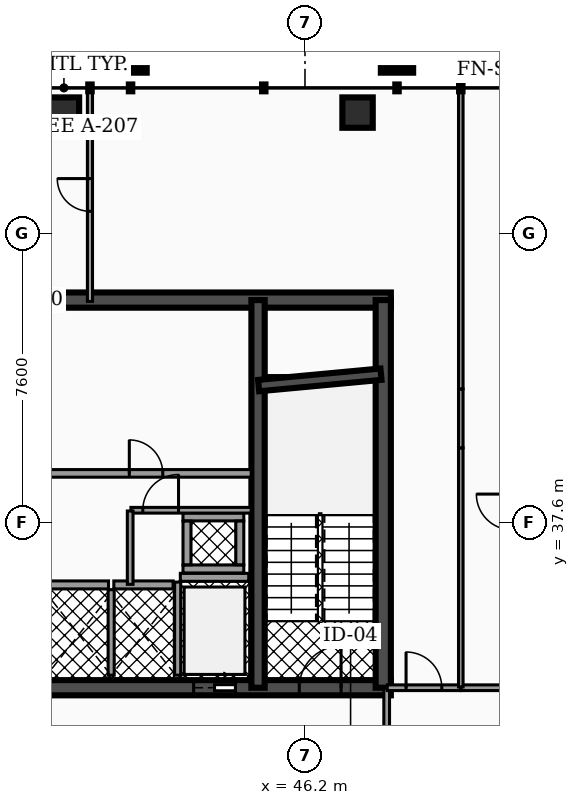
"""IFC4 building model, lengths in metres.
Left out: names, types, materials, properties, quantities, classifications, styles, units other than length and angle.
Written with IfcOpenShell. Run it as: python <this file> out.ifc"""

import sys

from ifc_helpers import new_model, si_unit, direction, frame, frame_2d, origin, origin_2d, place, context, subcontext, project, spatial, rectangle, hollow_rectangle, extrude, element, fill, save


model = new_model("IFC4")
c1 = context("Model", 3, precision=1e-05, world=origin(), true_north=direction((0.0, 1.0)))
c2 = subcontext(c1, "Body", "Model", "MODEL_VIEW")
j1 = project(units=[si_unit("LENGTHUNIT", "METRE"), si_unit("PLANEANGLEUNIT", "RADIAN")], contexts=[c1])
p1 = place(None, origin())
s1 = spatial("IfcSite", under=j1, at=p1, CompositionType="ELEMENT")
p2 = place(p1, origin())
s2 = spatial("IfcBuilding", under=s1, at=p2, CompositionType="ELEMENT")
p3 = place(p2, frame((0.0, 0.0, 145.86)))
s3 = spatial("IfcBuildingStorey", under=s2, at=p3, CompositionType="ELEMENT", Elevation=145.86)
p4 = place(p3, frame((28.4, 43.45, 0.0), z_axis=(0.0, 0.0, 1.0), x_axis=(1.0, 0.0, 0.0)))
e1 = element("IfcWall", 1, at=p4, inside=s3, PredefinedType="SHEAR", context=c2, shape_type="SweptSolid", body=[
    extrude(rectangle(XDim=20.06, YDim=0.4, at=frame_2d((10.03, 0.0))), origin(), (0.0, 0.0, 1.0), 3.5),
])
p5 = place(p3, frame((28.4, 33.25, 0.0), z_axis=(0.0, 0.0, 1.0), x_axis=(1.0, 0.0, 0.0)))
e2 = element("IfcWall", 2, at=p5, inside=s3, PredefinedType="SHEAR", context=c2, shape_type="SweptSolid", body=[
    extrude(rectangle(XDim=20.06, YDim=0.4, at=frame_2d((10.03, 0.0))), origin(), (0.0, 0.0, 1.0), 3.5),
])
p6 = place(p5, frame((4.03, 0.0, 0.0)))
e3 = element("IfcOpeningElement", 3, at=p6, cuts=e2, PredefinedType="OPENING", context=c2, shape_type="SweptSolid", body=[
    extrude(rectangle(XDim=1.1, YDim=2.15, at=frame_2d((0.55, 1.075))), frame((0.0, 0.21, 0.0), z_axis=(0.0, -1.0, 0.0), x_axis=(1.0, 0.0, 0.0)), (0.0, 0.0, 1.0), 0.42),
])
p7 = place(p5, frame((14.87, 0.0, 0.0)))
e4 = element("IfcOpeningElement", 4, at=p7, cuts=e2, PredefinedType="OPENING", context=c2, shape_type="SweptSolid", body=[
    extrude(rectangle(XDim=1.1, YDim=2.15, at=frame_2d((0.55, 1.075))), frame((0.0, 0.21, 0.0), z_axis=(0.0, -1.0, 0.0), x_axis=(1.0, 0.0, 0.0)), (0.0, 0.0, 1.0), 0.42),
])
p8 = place(p5, frame((5.95, 0.0, 0.0)))
e5 = element("IfcOpeningElement", 5, at=p8, cuts=e2, PredefinedType="OPENING", context=c2, shape_type="SweptSolid", body=[
    extrude(rectangle(XDim=1.0, YDim=2.1, at=frame_2d((0.5, 1.05))), frame((0.0, 0.21, 0.0), z_axis=(0.0, -1.0, 0.0), x_axis=(1.0, 0.0, 0.0)), (0.0, 0.0, 1.0), 0.42),
])
p9 = place(p5, frame((7.65, 0.0, 0.0)))
e6 = element("IfcOpeningElement", 6, at=p9, cuts=e2, PredefinedType="OPENING", context=c2, shape_type="SweptSolid", body=[
    extrude(rectangle(XDim=1.0, YDim=2.1, at=frame_2d((0.5, 1.05))), frame((0.0, 0.21, 0.0), z_axis=(0.0, -1.0, 0.0), x_axis=(1.0, 0.0, 0.0)), (0.0, 0.0, 1.0), 0.42),
])
p10 = place(p5, frame((1.31, 0.0, 0.0)))
e7 = element("IfcOpeningElement", 7, at=p10, cuts=e2, PredefinedType="OPENING", context=c2, shape_type="SweptSolid", body=[
    extrude(rectangle(XDim=1.1, YDim=2.2, at=frame_2d((0.55, 1.1))), frame((0.0, 0.21, 0.0), z_axis=(0.0, -1.0, 0.0), x_axis=(1.0, 0.0, 0.0)), (0.0, 0.0, 1.0), 0.42),
])
p11 = place(p5, frame((9.44, 0.0, 0.0)))
e8 = element("IfcOpeningElement", 8, at=p11, cuts=e2, PredefinedType="OPENING", context=c2, shape_type="SweptSolid", body=[
    extrude(rectangle(XDim=1.12, YDim=2.05, at=frame_2d((0.56, 1.025))), frame((0.0, 0.21, 0.0), z_axis=(0.0, -1.0, 0.0), x_axis=(1.0, 0.0, 0.0)), (0.0, 0.0, 1.0), 0.42),
])
p12 = place(p5, frame((17.65, 0.0, 0.0)))
e9 = element("IfcOpeningElement", 9, at=p12, cuts=e2, PredefinedType="OPENING", context=c2, shape_type="SweptSolid", body=[
    extrude(rectangle(XDim=1.1, YDim=2.2, at=frame_2d((0.55, 1.1))), frame((0.0, 0.21, 0.0), z_axis=(0.0, -1.0, 0.0), x_axis=(1.0, 0.0, 0.0)), (0.0, 0.0, 1.0), 0.42),
])
p13 = place(p3, frame((44.965, 33.25, 0.0), z_axis=(0.0, 0.0, 1.0), x_axis=(0.0, 1.0, 0.0)))
e10 = element("IfcWall", 10, at=p13, inside=s3, PredefinedType="SHEAR", context=c2, shape_type="SweptSolid", body=[
    extrude(rectangle(XDim=10.2, YDim=0.35, at=frame_2d((5.1, 0.0))), origin(), (0.0, 0.0, 1.0), 3.5),
])
p14 = place(p3, frame((48.26, 33.25, 0.0), z_axis=(0.0, 0.0, 1.0), x_axis=(0.0, 1.0, 0.0)))
e11 = element("IfcWall", 11, at=p14, inside=s3, PredefinedType="SHEAR", context=c2, shape_type="SweptSolid", body=[
    extrude(rectangle(XDim=10.2, YDim=0.4, at=frame_2d((5.1, 0.0))), origin(), (0.0, 0.0, 1.0), 3.5),
])
p15 = place(p3, frame((44.98, 41.2, 0.0), z_axis=(0.0, 0.0, 1.0), x_axis=(0.995686468965, 0.09278176286, 0.0)))
e12 = element("IfcWall", 12, at=p15, inside=s3, PredefinedType="SHEAR", context=c2, shape_type="SweptSolid", body=[
    extrude(rectangle(XDim=3.234, YDim=0.3, at=frame_2d((1.617, 0.0))), origin(), (0.0, 0.0, 1.0), 3.5),
])
for number, where, z_axis, x_axis in (
    (13, (47.583, 48.383, 0.0), (0.0, 0.0, 1.0), (1.0, 0.0, 0.0)),
    (14, (39.857, 48.383, 0.0), (0.0, 0.0, 1.0), (1.0, 0.0, 0.0)),
):
    element("IfcColumn", number, at=place(p3, frame(where, z_axis=z_axis, x_axis=x_axis)), inside=s3, PredefinedType="COLUMN", context=c2, shape_type="SweptSolid", body=[
        extrude(hollow_rectangle(XDim=0.8, YDim=0.8, WallThickness=0.04, at=origin_2d()), origin(), (0.0, 0.0, 1.0), 3.5),
    ])
p16 = place(p3, frame((42.92, 36.155, 0.0), z_axis=(0.0, 0.0, 1.0), x_axis=(1.0, 0.0, 0.0)))
e15 = element("IfcWall", 15, at=p16, inside=s3, PredefinedType="SOLIDWALL", context=c2, shape_type="SweptSolid", body=[
    extrude(rectangle(XDim=1.8, YDim=0.21, at=frame_2d((0.9, 0.0))), origin(), (0.0, 0.0, 1.0), 2.472),
])
p17 = place(p3, frame((42.85, 33.58, 0.0), z_axis=(0.0, 0.0, 1.0), x_axis=(0.0, 1.0, 0.0)))
e16 = element("IfcWall", 16, at=p17, inside=s3, PredefinedType="SOLIDWALL", context=c2, shape_type="SweptSolid", body=[
    extrude(rectangle(XDim=2.45, YDim=0.16, at=frame_2d((1.225, 0.0))), origin(), (0.0, 0.0, 1.0), 2.472),
])
p18 = place(p3, frame((39.47, 35.955, 0.0), z_axis=(0.0, 0.0, 1.0), x_axis=(1.0, 0.0, 0.0)))
e17 = element("IfcWall", 17, at=p18, inside=s3, PredefinedType="SOLIDWALL", context=c2, shape_type="SweptSolid", body=[
    extrude(rectangle(XDim=1.56, YDim=0.21, at=frame_2d((0.78, 0.0))), origin(), (0.0, 0.0, 1.0), 2.472),
])
p19 = place(p3, frame((41.1, 33.58, 0.0), z_axis=(0.0, 0.0, 1.0), x_axis=(0.0, 1.0, 0.0)))
e18 = element("IfcWall", 18, at=p19, inside=s3, PredefinedType="SOLIDWALL", context=c2, shape_type="SweptSolid", body=[
    extrude(rectangle(XDim=2.25, YDim=0.16, at=frame_2d((1.125, 0.0))), origin(), (0.0, 0.0, 1.0), 2.472),
])
p20 = place(p3, frame((41.17, 35.955, 0.0), z_axis=(0.0, 0.0, 1.0), x_axis=(1.0, 0.0, 0.0)))
e19 = element("IfcWall", 19, at=p20, inside=s3, PredefinedType="SOLIDWALL", context=c2, shape_type="SweptSolid", body=[
    extrude(rectangle(XDim=1.56, YDim=0.21, at=frame_2d((0.78, 0.0))), origin(), (0.0, 0.0, 1.0), 2.472),
])
for number, where, z_axis, x_axis in (
    (20, (42.99, 36.375, 0.0), (0.0, 0.0, 1.0), (1.0, 0.0, 0.0)),
    (21, (42.99, 37.745, 0.0), (0.0, 0.0, 1.0), (1.0, 0.0, 0.0)),
):
    element("IfcWall", number, at=place(p3, frame(where, z_axis=z_axis, x_axis=x_axis)), inside=s3, PredefinedType="SOLIDWALL", context=c2, shape_type="SweptSolid", body=[
        extrude(rectangle(XDim=1.6, YDim=0.21, at=frame_2d((0.8, 0.0))), origin(), (0.0, 0.0, 1.0), 3.5),
    ])
for number, where, z_axis, x_axis in (
    (22, (43.095, 36.485, 0.0), (0.0, 0.0, 1.0), (0.0, 1.0, 0.0)),
    (23, (44.485, 36.485, 0.0), (0.0, 0.0, 1.0), (0.0, 1.0, 0.0)),
):
    element("IfcWall", number, at=place(p3, frame(where, z_axis=z_axis, x_axis=x_axis)), inside=s3, PredefinedType="SOLIDWALL", context=c2, shape_type="SweptSolid", body=[
        extrude(rectangle(XDim=1.15, YDim=0.21, at=frame_2d((0.575, 0.0))), origin(), (0.0, 0.0, 1.0), 3.5),
    ])
p21 = place(p3, frame((39.25, 38.89, 0.0), z_axis=(0.0, 0.0, 1.0), x_axis=(1.0, 0.0, 0.0)))
e24 = element("IfcWall", 24, at=p21, inside=s3, PredefinedType="PARTITIONING", context=c2, shape_type="SweptSolid", body=[
    extrude(rectangle(XDim=5.535, YDim=0.2, at=frame_2d((2.768, 0.0))), origin(), (0.0, 0.0, 1.0), 2.457),
])
p22 = place(p21, frame((2.327, 0.0, 0.0)))
e25 = element("IfcOpeningElement", 25, at=p22, cuts=e24, PredefinedType="OPENING", context=c2, shape_type="SweptSolid", body=[
    extrude(rectangle(XDim=0.88, YDim=2.05, at=frame_2d((0.44, 1.025))), frame((0.0, 0.11, 0.0), z_axis=(0.0, -1.0, 0.0), x_axis=(1.0, 0.0, 0.0)), (0.0, 0.0, 1.0), 0.22),
])
p23 = place(p3, frame((41.62, 37.92, 0.0), z_axis=(0.0, 0.0, 1.0), x_axis=(1.0, 0.0, 0.0)))
e26 = element("IfcWall", 26, at=p23, inside=s3, PredefinedType="PARTITIONING", context=c2, shape_type="SweptSolid", body=[
    extrude(rectangle(XDim=3.165, YDim=0.15, at=frame_2d((1.583, 0.0))), origin(), (0.0, 0.0, 1.0), 2.457),
])
p24 = place(p23, frame((0.312, 0.0, 0.0)))
e27 = element("IfcOpeningElement", 27, at=p24, cuts=e26, PredefinedType="OPENING", context=c2, shape_type="SweptSolid", body=[
    extrude(rectangle(XDim=0.94, YDim=2.05, at=frame_2d((0.47, 1.025))), frame((0.0, 0.085, 0.0), z_axis=(0.0, -1.0, 0.0), x_axis=(1.0, 0.0, 0.0)), (0.0, 0.0, 1.0), 0.17),
])
p25 = place(p3, frame((41.6, 35.97, 0.0), z_axis=(0.0, 0.0, 1.0), x_axis=(0.0, 1.0, 0.0)))
e28 = element("IfcWall", 28, at=p25, inside=s3, PredefinedType="PARTITIONING", context=c2, shape_type="SweptSolid", body=[
    extrude(rectangle(XDim=1.93, YDim=0.15, at=frame_2d((0.965, 0.0))), origin(), (0.0, 0.0, 1.0), 2.457),
])
p26 = place(p3, frame((48.35, 30.17, 0.0), z_axis=(0.0, 0.0, 1.0), x_axis=(0.0, 1.0, 0.0)))
e29 = element("IfcWall", 29, at=p26, inside=s3, PredefinedType="PARTITIONING", context=c2, shape_type="SweptSolid", body=[
    extrude(rectangle(XDim=3.06, YDim=0.15, at=frame_2d((1.53, 0.0))), origin(), (0.0, 0.0, 1.0), 2.457),
])
p27 = place(p26, frame((1.06, 0.0, 0.0)))
e30 = element("IfcOpeningElement", 30, at=p27, cuts=e29, PredefinedType="OPENING", context=c2, shape_type="SweptSolid", body=[
    extrude(rectangle(XDim=0.94, YDim=2.05, at=frame_2d((0.47, 1.025))), frame((0.0, 0.085, 0.0), z_axis=(0.0, -1.0, 0.0), x_axis=(1.0, 0.0, 0.0)), (0.0, 0.0, 1.0), 0.17),
])
p28 = place(p3, frame((50.305, 33.25, 0.0), z_axis=(0.0, 0.0, 1.0), x_axis=(1.0, 0.0, 0.0)))
e31 = element("IfcWall", 31, at=p28, inside=s3, PredefinedType="PARTITIONING", context=c2, shape_type="SweptSolid", body=[
    extrude(rectangle(XDim=1.325, YDim=0.15, at=frame_2d((0.663, 0.0))), origin(), (0.0, 0.0, 1.0), 2.457),
])
p29 = place(p3, frame((48.365, 33.25, 0.0), z_axis=(0.0, 0.0, 1.0), x_axis=(1.0, 0.0, 0.0)))
e32 = element("IfcWall", 32, at=p29, inside=s3, PredefinedType="PARTITIONING", context=c2, shape_type="SweptSolid", body=[
    extrude(rectangle(XDim=1.93, YDim=0.15, at=frame_2d((0.965, 0.0))), origin(), (0.0, 0.0, 1.0), 2.457),
])
p30 = place(p29, frame((0.495, 0.0, 0.0)))
e33 = element("IfcOpeningElement", 33, at=p30, cuts=e32, PredefinedType="OPENING", context=c2, shape_type="SweptSolid", body=[
    extrude(rectangle(XDim=0.94, YDim=2.05, at=frame_2d((0.47, 1.025))), frame((0.0, 0.085, 0.0), z_axis=(0.0, -1.0, 0.0), x_axis=(1.0, 0.0, 0.0)), (0.0, 0.0, 1.0), 0.17),
])
p31 = place(p3, frame((50.3, 33.27, 0.0), z_axis=(0.0, 0.0, 1.0), x_axis=(0.0, 1.0, 0.0)))
e34 = element("IfcWall", 34, at=p31, inside=s3, PredefinedType="PARTITIONING", context=c2, shape_type="SweptSolid", body=[
    extrude(rectangle(XDim=6.292, YDim=0.12, at=frame_2d((3.146, 0.0))), origin(), (0.0, 0.0, 1.0), 2.457),
])
p32 = place(p3, frame((50.3, 39.562, 0.0), z_axis=(0.0, 0.0, 1.0), x_axis=(0.0, 1.0, 0.0)))
e35 = element("IfcWall", 35, at=p32, inside=s3, PredefinedType="PARTITIONING", context=c2, shape_type="SweptSolid", body=[
    extrude(rectangle(XDim=1.55, YDim=0.12, at=frame_2d((0.775, 0.0))), origin(), (0.0, 0.0, 1.0), 2.457),
])
p33 = place(p3, frame((50.3, 41.112, 0.0), z_axis=(0.0, 0.0, 1.0), x_axis=(0.0, 1.0, 0.0)))
e36 = element("IfcWall", 36, at=p33, inside=s3, PredefinedType="PARTITIONING", context=c2, shape_type="SweptSolid", body=[
    extrude(rectangle(XDim=7.907, YDim=0.12, at=frame_2d((3.953, 0.0))), origin(), (0.0, 0.0, 1.0), 2.457),
])
p34 = place(p3, frame((40.542, 43.415, 0.0), z_axis=(0.0, 0.0, 1.0), x_axis=(0.0, 1.0, 0.0)))
e37 = element("IfcWall", 37, at=p34, inside=s3, PredefinedType="PARTITIONING", context=c2, shape_type="SweptSolid", body=[
    extrude(rectangle(XDim=5.603, YDim=0.135, at=frame_2d((2.802, 0.0))), origin(), (0.0, 0.0, 1.0), 2.457),
])
p35 = place(p34, frame((2.372, 0.0, 0.0)))
e38 = element("IfcOpeningElement", 38, at=p35, cuts=e37, PredefinedType="OPENING", context=c2, shape_type="SweptSolid", body=[
    extrude(rectangle(XDim=0.86, YDim=2.05, at=frame_2d((0.43, 1.025))), frame((0.0, 0.077, 0.0), z_axis=(0.0, -1.0, 0.0), x_axis=(1.0, 0.0, 0.0)), (0.0, 0.0, 1.0), 0.155),
])
p36 = place(p7, origin())
e39 = element("IfcDoor", 39, at=p36, inside=s3, OperationType="SLIDING_TO_RIGHT", PredefinedType="DOOR", context=c2, shape_type="SweptSolid", body=[
    extrude(rectangle(XDim=1.1, YDim=2.15, at=frame_2d((0.55, 1.075))), frame((0.0, 0.025, 0.0), z_axis=(0.0, -1.0, 0.0), x_axis=(1.0, 0.0, 0.0)), (0.0, 0.0, 1.0), 0.05),
])
fill(e4, e39)
p37 = place(p12, origin())
e40 = element("IfcDoor", 40, at=p37, inside=s3, OperationType="SINGLE_SWING_RIGHT", PredefinedType="DOOR", context=c2, shape_type="SweptSolid", body=[
    extrude(rectangle(XDim=1.1, YDim=2.2, at=frame_2d((0.55, 1.1))), frame((0.0, 0.025, 0.0), z_axis=(0.0, -1.0, 0.0), x_axis=(1.0, 0.0, 0.0)), (0.0, 0.0, 1.0), 0.05),
])
fill(e9, e40)
p38 = place(p22, origin())
e41 = element("IfcDoor", 41, at=p38, inside=s3, OperationType="SINGLE_SWING_LEFT", PredefinedType="DOOR", context=c2, shape_type="SweptSolid", body=[
    extrude(rectangle(XDim=0.88, YDim=2.05, at=frame_2d((0.44, 1.025))), frame((0.0, 0.025, 0.0), z_axis=(0.0, -1.0, 0.0), x_axis=(1.0, 0.0, 0.0)), (0.0, 0.0, 1.0), 0.05),
])
fill(e25, e41)
p39 = place(p24, origin())
e42 = element("IfcDoor", 42, at=p39, inside=s3, OperationType="SINGLE_SWING_RIGHT", PredefinedType="DOOR", context=c2, shape_type="SweptSolid", body=[
    extrude(rectangle(XDim=0.94, YDim=2.05, at=frame_2d((0.47, 1.025))), frame((0.0, 0.025, 0.0), z_axis=(0.0, -1.0, 0.0), x_axis=(1.0, 0.0, 0.0)), (0.0, 0.0, 1.0), 0.05),
])
fill(e27, e42)
p40 = place(p30, origin())
e43 = element("IfcDoor", 43, at=p40, inside=s3, OperationType="SINGLE_SWING_LEFT", PredefinedType="DOOR", context=c2, shape_type="SweptSolid", body=[
    extrude(rectangle(XDim=0.94, YDim=2.05, at=frame_2d((0.47, 1.025))), frame((0.0, 0.025, 0.0), z_axis=(0.0, -1.0, 0.0), x_axis=(1.0, 0.0, 0.0)), (0.0, 0.0, 1.0), 0.05),
])
fill(e33, e43)
p41 = place(p35, origin())
e44 = element("IfcDoor", 44, at=p41, inside=s3, OperationType="SINGLE_SWING_RIGHT", PredefinedType="DOOR", context=c2, shape_type="SweptSolid", body=[
    extrude(rectangle(XDim=0.86, YDim=2.05, at=frame_2d((0.43, 1.025))), frame((0.0, 0.025, 0.0), z_axis=(0.0, -1.0, 0.0), x_axis=(1.0, 0.0, 0.0)), (0.0, 0.0, 1.0), 0.05),
])
fill(e38, e44)
save(model, sys.argv[1])
